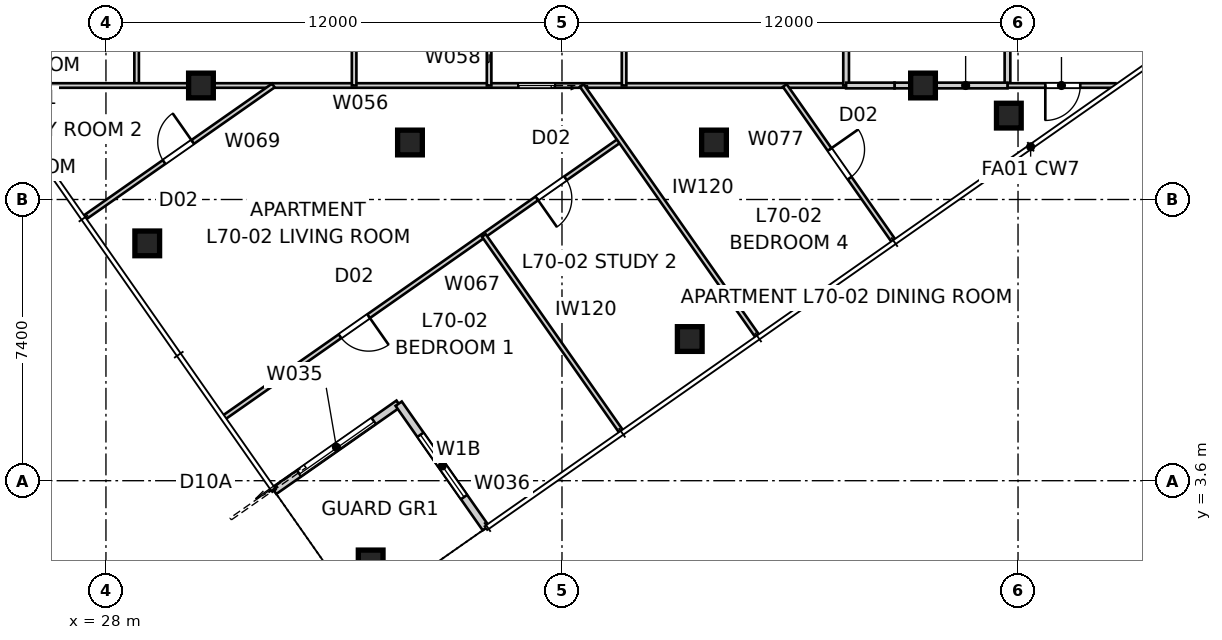
"""IFC4 building model, lengths in metres.
Left out: names, types, materials, properties, quantities, classifications, styles, units other than length and angle.
Written with IfcOpenShell. Run it as: python <this file> out.ifc"""

import sys

from ifc_helpers import new_model, si_unit, direction, frame, frame_2d, origin, origin_2d, place, context, subcontext, project, spatial, rectangle, extrude, element, fill, save


model = new_model("IFC4")
c1 = context("Model", 3, precision=1e-05, world=origin(), true_north=direction((0.0, 1.0)))
c2 = subcontext(c1, "Body", "Model", "MODEL_VIEW")
j1 = project(units=[si_unit("LENGTHUNIT", "METRE"), si_unit("PLANEANGLEUNIT", "RADIAN")], contexts=[c1])
p1 = place(None, origin())
s1 = spatial("IfcSite", under=j1, at=p1, CompositionType="ELEMENT")
p2 = place(p1, origin())
s2 = spatial("IfcBuilding", under=s1, at=p2, CompositionType="ELEMENT")
p3 = place(p2, frame((0.0, 0.0, 254.0)))
s3 = spatial("IfcBuildingStorey", under=s2, at=p3, CompositionType="ELEMENT", Elevation=254.0)
for number, where, z_axis, x_axis in (
    (1, (34.966, 1.449, 0.0), (0.0, 0.0, 1.0), (1.0, 0.0, 0.0)),
    (2, (43.362, 7.328, 0.0), (0.0, 0.0, 1.0), (1.0, 0.0, 0.0)),
    (3, (51.758, 13.207, 0.0), (0.0, 0.0, 1.0), (1.0, 0.0, 0.0)),
    (4, (29.086, 9.845, 0.0), (0.0, 0.0, 1.0), (1.0, 0.0, 0.0)),
    (5, (30.5, 14.0, 0.0), (0.0, 0.0, 1.0), (1.0, 0.0, 0.0)),
    (6, (36.0, 12.5, 0.0), (0.0, 0.0, 1.0), (1.0, 0.0, 0.0)),
    (7, (44.0, 12.5, 0.0), (0.0, 0.0, 1.0), (1.0, 0.0, 0.0)),
    (8, (49.5, 14.0, 0.0), (0.0, 0.0, 1.0), (1.0, 0.0, 0.0)),
):
    element("IfcColumn", number, at=place(p3, frame(where, z_axis=z_axis, x_axis=x_axis)), inside=s3, PredefinedType="COLUMN", context=c2, shape_type="SweptSolid", body=[
        extrude(rectangle(XDim=0.65, YDim=0.65, at=origin_2d()), origin(), (0.0, 0.0, 1.0), 3.4),
    ])
p4 = place(p3, frame((32.426, 3.333, 0.0), z_axis=(0.0, 0.0, 1.0), x_axis=(0.819165963305, 0.573556557423, 0.0)))
e9 = element("IfcWall", 9, at=p4, inside=s3, PredefinedType="SOLIDWALL", context=c2, shape_type="SweptSolid", body=[
    extrude(rectangle(XDim=4.0, YDim=0.2, at=frame_2d((2.0, 0.0))), origin(), (0.0, 0.0, 1.0), 3.25),
])
p5 = place(p4, frame((0.8, 0.0, 0.0)))
e10 = element("IfcOpeningElement", 10, at=p5, cuts=e9, PredefinedType="OPENING", context=c2, shape_type="SweptSolid", body=[
    extrude(rectangle(XDim=2.4, YDim=2.1, at=frame_2d((1.2, 1.05))), frame((0.0, 0.11, 0.0), z_axis=(0.0, -1.0, 0.0), x_axis=(1.0, 0.0, 0.0)), (0.0, 0.0, 1.0), 0.22),
])
p6 = place(p3, frame((35.702, 5.627, 0.0), z_axis=(0.0, 0.0, 1.0), x_axis=(0.573597512525, -0.819137286189, 0.0)))
e11 = element("IfcWall", 11, at=p6, inside=s3, PredefinedType="SOLIDWALL", context=c2, shape_type="SweptSolid", body=[
    extrude(rectangle(XDim=4.0, YDim=0.2, at=frame_2d((2.0, 0.0))), origin(), (0.0, 0.0, 1.0), 3.25),
])
p7 = place(p6, frame((1.0, 0.0, 0.45)))
e12 = element("IfcOpeningElement", 12, at=p7, cuts=e11, PredefinedType="OPENING", context=c2, shape_type="SweptSolid", body=[
    extrude(rectangle(XDim=2.0, YDim=1.8, at=frame_2d((1.0, 0.9))), frame((0.0, 0.11, 0.0), z_axis=(0.0, -1.0, 0.0), x_axis=(1.0, 0.0, 0.0)), (0.0, 0.0, 1.0), 0.22),
])
p8 = place(p3, frame((28.807, 17.041, 0.0), z_axis=(0.0, 0.0, 1.0), x_axis=(0.0, -1.0, 0.0)))
e13 = element("IfcWall", 13, at=p8, inside=s3, PredefinedType="PARTITIONING", context=c2, shape_type="SweptSolid", body=[
    extrude(rectangle(XDim=3.041, YDim=0.12, at=frame_2d((1.521, 0.0))), origin(), (0.0, 0.0, 1.0), 3.25),
])
p9 = place(p8, frame((1.041, 0.0, 0.0)))
e14 = element("IfcOpeningElement", 14, at=p9, cuts=e13, PredefinedType="OPENING", context=c2, shape_type="SweptSolid", body=[
    extrude(rectangle(XDim=0.96, YDim=2.1, at=frame_2d((0.48, 1.05))), frame((0.0, 0.07, 0.0), z_axis=(0.0, -1.0, 0.0), x_axis=(1.0, 0.0, 0.0)), (0.0, 0.0, 1.0), 0.14),
])
p10 = place(p3, frame((47.476, 14.0, 0.0), z_axis=(0.0, 0.0, 1.0), x_axis=(-1.0, 0.0, 0.0)))
e15 = element("IfcWall", 15, at=p10, inside=s3, PredefinedType="PARTITIONING", context=c2, shape_type="SweptSolid", body=[
    extrude(rectangle(XDim=22.471, YDim=0.12, at=frame_2d((11.235, 0.0))), origin(), (0.0, 0.0, 1.0), 2.549),
])
p11 = place(p10, frame((7.664, 0.0, 0.0)))
e16 = element("IfcOpeningElement", 16, at=p11, cuts=e15, PredefinedType="OPENING", context=c2, shape_type="SweptSolid", body=[
    extrude(rectangle(XDim=0.96, YDim=2.1, at=frame_2d((0.48, 1.05))), frame((0.0, 0.07, 0.0), z_axis=(0.0, -1.0, 0.0), x_axis=(1.0, 0.0, 0.0)), (0.0, 0.0, 1.0), 0.14),
])
p12 = place(p3, frame((34.53, 17.9, 0.0), z_axis=(0.0, 0.0, 1.0), x_axis=(0.0, -1.0, 0.0)))
e17 = element("IfcWall", 17, at=p12, inside=s3, PredefinedType="PARTITIONING", context=c2, shape_type="SweptSolid", body=[
    extrude(rectangle(XDim=3.9, YDim=0.12, at=frame_2d((1.95, 0.0))), origin(), (0.0, 0.0, 1.0), 3.25),
])
p13 = place(p12, frame((1.47, 0.0, 0.0)))
e18 = element("IfcOpeningElement", 18, at=p13, cuts=e17, PredefinedType="OPENING", context=c2, shape_type="SweptSolid", body=[
    extrude(rectangle(XDim=0.96, YDim=2.1, at=frame_2d((0.48, 1.05))), frame((0.0, 0.07, 0.0), z_axis=(0.0, -1.0, 0.0), x_axis=(1.0, 0.0, 0.0)), (0.0, 0.0, 1.0), 0.14),
])
p14 = place(p3, frame((38.082, 14.0, 0.0), z_axis=(0.0, 0.0, 1.0), x_axis=(0.0, 1.0, 0.0)))
e19 = element("IfcWall", 19, at=p14, inside=s3, PredefinedType="PARTITIONING", context=c2, shape_type="SweptSolid", body=[
    extrude(rectangle(XDim=3.9, YDim=0.12, at=frame_2d((1.95, 0.0))), origin(), (0.0, 0.0, 1.0), 3.25),
])
p15 = place(p14, frame((1.47, 0.0, 0.0)))
e20 = element("IfcOpeningElement", 20, at=p15, cuts=e19, PredefinedType="OPENING", context=c2, shape_type="SweptSolid", body=[
    extrude(rectangle(XDim=0.96, YDim=2.1, at=frame_2d((0.48, 1.05))), frame((0.0, 0.07, 0.0), z_axis=(0.0, -1.0, 0.0), x_axis=(1.0, 0.0, 0.0)), (0.0, 0.0, 1.0), 0.14),
])
p16 = place(p3, frame((41.634, 17.9, 0.0), z_axis=(0.0, 0.0, 1.0), x_axis=(0.0, -1.0, 0.0)))
e21 = element("IfcWall", 21, at=p16, inside=s3, PredefinedType="PARTITIONING", context=c2, shape_type="SweptSolid", body=[
    extrude(rectangle(XDim=3.9, YDim=0.12, at=frame_2d((1.95, 0.0))), origin(), (0.0, 0.0, 1.0), 3.25),
])
p17 = place(p16, frame((1.47, 0.0, 0.0)))
e22 = element("IfcOpeningElement", 22, at=p17, cuts=e21, PredefinedType="OPENING", context=c2, shape_type="SweptSolid", body=[
    extrude(rectangle(XDim=0.96, YDim=2.1, at=frame_2d((0.48, 1.05))), frame((0.0, 0.07, 0.0), z_axis=(0.0, -1.0, 0.0), x_axis=(1.0, 0.0, 0.0)), (0.0, 0.0, 1.0), 0.14),
])
p18 = place(p3, frame((47.476, 17.9, 0.0), z_axis=(0.0, 0.0, 1.0), x_axis=(0.0, -1.0, 0.0)))
e23 = element("IfcWall", 23, at=p18, inside=s3, PredefinedType="SOLIDWALL", context=c2, shape_type="SweptSolid", body=[
    extrude(rectangle(XDim=3.9, YDim=0.15, at=frame_2d((1.95, 0.0))), origin(), (0.0, 0.0, 1.0), 3.25),
])
p19 = place(p18, frame((1.47, 0.0, 0.0)))
e24 = element("IfcOpeningElement", 24, at=p19, cuts=e23, PredefinedType="OPENING", context=c2, shape_type="SweptSolid", body=[
    extrude(rectangle(XDim=0.96, YDim=2.1, at=frame_2d((0.48, 1.05))), frame((0.0, 0.085, 0.0), z_axis=(0.0, -1.0, 0.0), x_axis=(1.0, 0.0, 0.0)), (0.0, 0.0, 1.0), 0.17),
])
p20 = place(p3, frame((51.722, 14.0, 0.0), z_axis=(0.0, 0.0, 1.0), x_axis=(0.0, 1.0, 0.0)))
e25 = element("IfcWall", 25, at=p20, inside=s3, PredefinedType="SOLIDWALL", context=c2, shape_type="SweptSolid", body=[
    extrude(rectangle(XDim=4.82, YDim=0.15, at=frame_2d((2.41, 0.0))), origin(), (0.0, 0.0, 1.0), 3.25),
])
p21 = place(p20, frame((1.49, 0.0, 0.0)))
e26 = element("IfcOpeningElement", 26, at=p21, cuts=e25, PredefinedType="OPENING", context=c2, shape_type="SweptSolid", body=[
    extrude(rectangle(XDim=0.92, YDim=2.1, at=frame_2d((0.46, 1.05))), frame((0.0, 0.085, 0.0), z_axis=(0.0, -1.0, 0.0), x_axis=(1.0, 0.0, 0.0)), (0.0, 0.0, 1.0), 0.17),
])
p22 = place(p3, frame((54.564, 14.0, 0.0), z_axis=(0.0, 0.0, 1.0), x_axis=(-1.0, 0.0, 0.0)))
e27 = element("IfcWall", 27, at=p22, inside=s3, PredefinedType="PARTITIONING", context=c2, shape_type="SweptSolid", body=[
    extrude(rectangle(XDim=2.842, YDim=0.12, at=frame_2d((1.421, 0.0))), origin(), (0.0, 0.0, 1.0), 3.25),
])
p23 = place(p22, frame((0.926, 0.0, 0.0)))
e28 = element("IfcOpeningElement", 28, at=p23, cuts=e27, PredefinedType="OPENING", context=c2, shape_type="SweptSolid", body=[
    extrude(rectangle(XDim=0.92, YDim=2.34, at=frame_2d((0.46, 1.17))), frame((0.0, 0.07, 0.0), z_axis=(0.0, -1.0, 0.0), x_axis=(1.0, 0.0, 0.0)), (0.0, 0.0, 1.0), 0.14),
])
p24 = place(p3, frame((51.722, 14.0, 0.0), z_axis=(0.0, 0.0, 1.0), x_axis=(-1.0, 0.0, 0.0)))
e29 = element("IfcWall", 29, at=p24, inside=s3, PredefinedType="SOLIDWALL", context=c2, shape_type="SweptSolid", body=[
    extrude(rectangle(XDim=2.202, YDim=0.15, at=frame_2d((1.101, 0.0))), origin(), (0.0, 0.0, 1.0), 3.25),
])
p25 = place(p3, frame((49.521, 14.0, 0.0), z_axis=(0.0, 0.0, 1.0), x_axis=(-1.0, 0.0, 0.0)))
e30 = element("IfcWall", 30, at=p25, inside=s3, PredefinedType="SOLIDWALL", context=c2, shape_type="SweptSolid", body=[
    extrude(rectangle(XDim=0.771, YDim=0.15, at=frame_2d((0.385, 0.0))), origin(), (0.0, 0.0, 1.0), 2.549),
])
p26 = place(p3, frame((48.75, 14.0, 0.0), z_axis=(0.0, 0.0, 1.0), x_axis=(-1.0, 0.0, 0.0)))
e31 = element("IfcWall", 31, at=p26, inside=s3, PredefinedType="SOLIDWALL", context=c2, shape_type="SweptSolid", body=[
    extrude(rectangle(XDim=1.274, YDim=0.15, at=frame_2d((0.637, 0.0))), origin(), (0.0, 0.0, 1.0), 3.25),
])
p27 = place(p3, frame((41.528, 12.562, 0.0), z_axis=(0.0, 0.0, 1.0), x_axis=(-0.819146182185, -0.573584808212, 0.0)))
e32 = element("IfcWall", 32, at=p27, inside=s3, PredefinedType="PARTITIONING", context=c2, shape_type="SweptSolid", body=[
    extrude(rectangle(XDim=12.71, YDim=0.12, at=frame_2d((6.355, 0.0))), origin(), (0.0, 0.0, 1.0), 3.25),
])
p28 = place(p27, frame((8.077, 0.0, 0.0)))
e33 = element("IfcOpeningElement", 33, at=p28, cuts=e32, PredefinedType="OPENING", context=c2, shape_type="SweptSolid", body=[
    extrude(rectangle(XDim=0.92, YDim=2.34, at=frame_2d((0.46, 1.17))), frame((0.0, 0.07, 0.0), z_axis=(0.0, -1.0, 0.0), x_axis=(1.0, 0.0, 0.0)), (0.0, 0.0, 1.0), 0.14),
])
p29 = place(p27, frame((1.752, 0.0, 0.0)))
e34 = element("IfcOpeningElement", 34, at=p29, cuts=e32, PredefinedType="OPENING", context=c2, shape_type="SweptSolid", body=[
    extrude(rectangle(XDim=0.92, YDim=2.34, at=frame_2d((0.46, 1.17))), frame((0.0, 0.07, 0.0), z_axis=(0.0, -1.0, 0.0), x_axis=(1.0, 0.0, 0.0)), (0.0, 0.0, 1.0), 0.14),
])
p30 = place(p3, frame((40.521, 14.0, 0.0), z_axis=(0.0, 0.0, 1.0), x_axis=(0.573574225095, -0.819153592623, 0.0)))
e35 = element("IfcWall", 35, at=p30, inside=s3, PredefinedType="PARTITIONING", context=c2, shape_type="SweptSolid", body=[
    extrude(rectangle(XDim=8.054, YDim=0.12, at=frame_2d((4.027, 0.0))), origin(), (0.0, 0.0, 1.0), 3.25),
])
p31 = place(p3, frame((27.44, 10.523, 0.0), z_axis=(0.0, 0.0, 1.0), x_axis=(0.81915432861, 0.573573173989, 0.0)))
e36 = element("IfcWall", 36, at=p31, inside=s3, PredefinedType="PARTITIONING", context=c2, shape_type="SweptSolid", body=[
    extrude(rectangle(XDim=6.061, YDim=0.12, at=frame_2d((3.031, 0.0))), origin(), (0.0, 0.0, 1.0), 3.25),
])
p32 = place(p31, frame((2.551, 0.0, 0.0)))
e37 = element("IfcOpeningElement", 37, at=p32, cuts=e36, PredefinedType="OPENING", context=c2, shape_type="SweptSolid", body=[
    extrude(rectangle(XDim=0.92, YDim=2.34, at=frame_2d((0.46, 1.17))), frame((0.0, 0.07, 0.0), z_axis=(0.0, -1.0, 0.0), x_axis=(1.0, 0.0, 0.0)), (0.0, 0.0, 1.0), 0.14),
])
p33 = place(p3, frame((37.944, 10.053, 0.0), z_axis=(0.0, 0.0, 1.0), x_axis=(0.573587188897, -0.81914451517, 0.0)))
e38 = element("IfcWall", 38, at=p33, inside=s3, PredefinedType="PARTITIONING", context=c2, shape_type="SweptSolid", body=[
    extrude(rectangle(XDim=6.3, YDim=0.12, at=frame_2d((3.15, 0.0))), origin(), (0.0, 0.0, 1.0), 3.25),
])
p34 = place(p3, frame((45.862, 14.0, 0.0), z_axis=(0.0, 0.0, 1.0), x_axis=(0.57358708951, -0.819144584763, 0.0)))
e39 = element("IfcWall", 39, at=p34, inside=s3, PredefinedType="PARTITIONING", context=c2, shape_type="SweptSolid", body=[
    extrude(rectangle(XDim=4.991, YDim=0.12, at=frame_2d((2.496, 0.0))), origin(), (0.0, 0.0, 1.0), 3.25),
])
p35 = place(p34, frame((2.055, 0.0, 0.0)))
e40 = element("IfcOpeningElement", 40, at=p35, cuts=e39, PredefinedType="OPENING", context=c2, shape_type="SweptSolid", body=[
    extrude(rectangle(XDim=0.92, YDim=2.34, at=frame_2d((0.46, 1.17))), frame((0.0, 0.07, 0.0), z_axis=(0.0, -1.0, 0.0), x_axis=(1.0, 0.0, 0.0)), (0.0, 0.0, 1.0), 0.14),
])
p36 = place(p5, origin())
e41 = element("IfcDoor", 41, at=p36, inside=s3, OperationType="SLIDING_TO_LEFT", PredefinedType="DOOR", context=c2, shape_type="SweptSolid", body=[
    extrude(rectangle(XDim=2.4, YDim=2.1, at=frame_2d((1.2, 1.05))), frame((0.0, 0.025, 0.0), z_axis=(0.0, -1.0, 0.0), x_axis=(1.0, 0.0, 0.0)), (0.0, 0.0, 1.0), 0.05),
])
fill(e10, e41)
p37 = place(p7, origin())
e42 = element("IfcWindow", 42, at=p37, inside=s3, PartitioningType="SINGLE_PANEL", PredefinedType="WINDOW", context=c2, shape_type="SweptSolid", body=[
    extrude(rectangle(XDim=2.0, YDim=1.8, at=frame_2d((1.0, 0.9))), frame((0.0, 0.03, 0.0), z_axis=(0.0, -1.0, 0.0), x_axis=(1.0, 0.0, 0.0)), (0.0, 0.0, 1.0), 0.06),
])
fill(e12, e42)
p38 = place(p23, origin())
e43 = element("IfcDoor", 43, at=p38, inside=s3, OperationType="SINGLE_SWING_RIGHT", PredefinedType="DOOR", context=c2, shape_type="SweptSolid", body=[
    extrude(rectangle(XDim=0.92, YDim=2.34, at=frame_2d((0.46, 1.17))), frame((0.0, 0.025, 0.0), z_axis=(0.0, -1.0, 0.0), x_axis=(1.0, 0.0, 0.0)), (0.0, 0.0, 1.0), 0.05),
])
fill(e28, e43)
p39 = place(p35, origin())
e44 = element("IfcDoor", 44, at=p39, inside=s3, OperationType="SINGLE_SWING_LEFT", PredefinedType="DOOR", context=c2, shape_type="SweptSolid", body=[
    extrude(rectangle(XDim=0.92, YDim=2.34, at=frame_2d((0.46, 1.17))), frame((0.0, 0.025, 0.0), z_axis=(0.0, -1.0, 0.0), x_axis=(1.0, 0.0, 0.0)), (0.0, 0.0, 1.0), 0.05),
])
fill(e40, e44)
p40 = place(p11, origin())
e45 = element("IfcDoor", 45, at=p40, inside=s3, OperationType="SLIDING_TO_LEFT", PredefinedType="DOOR", context=c2, shape_type="SweptSolid", body=[
    extrude(rectangle(XDim=0.96, YDim=2.1, at=frame_2d((0.48, 1.05))), frame((0.0, 0.025, 0.0), z_axis=(0.0, -1.0, 0.0), x_axis=(1.0, 0.0, 0.0)), (0.0, 0.0, 1.0), 0.05),
])
fill(e16, e45)
p41 = place(p28, origin())
e46 = element("IfcDoor", 46, at=p41, inside=s3, OperationType="SINGLE_SWING_LEFT", PredefinedType="DOOR", context=c2, shape_type="SweptSolid", body=[
    extrude(rectangle(XDim=0.92, YDim=2.34, at=frame_2d((0.46, 1.17))), frame((0.0, 0.025, 0.0), z_axis=(0.0, -1.0, 0.0), x_axis=(1.0, 0.0, 0.0)), (0.0, 0.0, 1.0), 0.05),
])
fill(e33, e46)
p42 = place(p32, origin())
e47 = element("IfcDoor", 47, at=p42, inside=s3, OperationType="SINGLE_SWING_RIGHT", PredefinedType="DOOR", context=c2, shape_type="SweptSolid", body=[
    extrude(rectangle(XDim=0.92, YDim=2.34, at=frame_2d((0.46, 1.17))), frame((0.0, 0.025, 0.0), z_axis=(0.0, -1.0, 0.0), x_axis=(1.0, 0.0, 0.0)), (0.0, 0.0, 1.0), 0.05),
])
fill(e37, e47)
p43 = place(p29, origin())
e48 = element("IfcDoor", 48, at=p43, inside=s3, OperationType="SINGLE_SWING_RIGHT", PredefinedType="DOOR", context=c2, shape_type="SweptSolid", body=[
    extrude(rectangle(XDim=0.92, YDim=2.34, at=frame_2d((0.46, 1.17))), frame((0.0, 0.025, 0.0), z_axis=(0.0, -1.0, 0.0), x_axis=(1.0, 0.0, 0.0)), (0.0, 0.0, 1.0), 0.05),
])
fill(e34, e48)
save(model, sys.argv[1])
